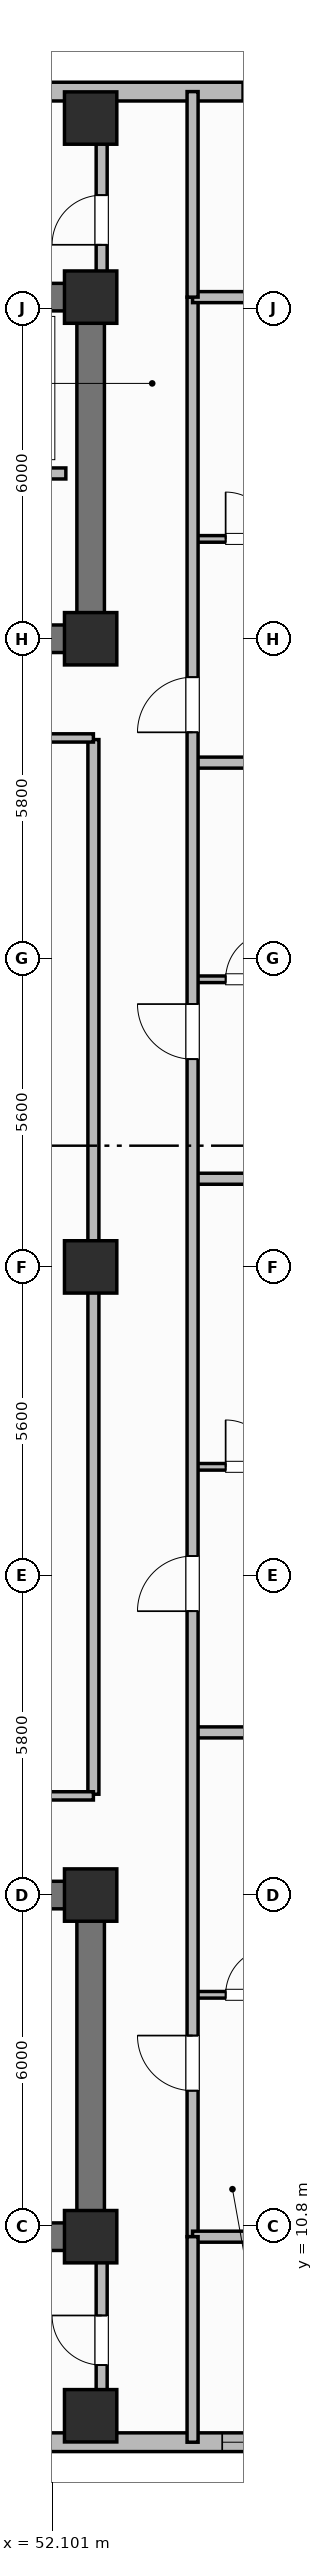
"""IFC4 building model, lengths in metres.
Left out: names, types, materials, properties, quantities, classifications, styles, units other than length and angle.
Written with IfcOpenShell. Run it as: python <this file> out.ifc"""

import sys

from ifc_helpers import new_model, si_unit, direction, frame, frame_2d, origin, origin_2d, place, context, subcontext, project, spatial, rectangle, extrude, element, fill, save


model = new_model("IFC4")
c1 = context("Model", 3, precision=1e-05, world=origin(), true_north=direction((0.0, 1.0)))
c2 = subcontext(c1, "Body", "Model", "MODEL_VIEW")
j1 = project(units=[si_unit("LENGTHUNIT", "METRE"), si_unit("PLANEANGLEUNIT", "RADIAN")], contexts=[c1])
p1 = place(None, origin())
s1 = spatial("IfcSite", under=j1, at=p1, CompositionType="ELEMENT")
p2 = place(p1, origin())
s2 = spatial("IfcBuilding", under=s1, at=p2, CompositionType="ELEMENT")
p3 = place(p2, frame((0.0, 0.0, 181.1)))
s3 = spatial("IfcBuildingStorey", under=s2, at=p3, CompositionType="ELEMENT", Elevation=181.1)
p4 = place(p3, frame((52.8, 10.6, 0.0), z_axis=(0.0, 0.0, 1.0), x_axis=(-1.0, 0.0, 0.0)))
e1 = element("IfcWall", 1, at=p4, inside=s3, PredefinedType="SHEAR", context=c2, shape_type="SweptSolid", body=[
    extrude(rectangle(XDim=27.2, YDim=0.5, at=frame_2d((13.6, 0.0))), origin(), (0.0, 0.0, 1.0), 3.7),
])
p5 = place(p3, frame((52.8, 10.85, 0.0), z_axis=(0.0, 0.0, 1.0), x_axis=(0.0, 1.0, 0.0)))
e2 = element("IfcWall", 2, at=p5, inside=s3, PredefinedType="SHEAR", context=c2, shape_type="SweptSolid", body=[
    extrude(rectangle(XDim=5.7, YDim=0.5, at=frame_2d((2.85, 0.0))), origin(), (0.0, 0.0, 1.0), 3.7),
])
p6 = place(p3, frame((25.6, 16.8, 0.0), z_axis=(0.0, 0.0, 1.0), x_axis=(1.0, 0.0, 0.0)))
e3 = element("IfcWall", 3, at=p6, inside=s3, PredefinedType="SHEAR", context=c2, shape_type="SweptSolid", body=[
    extrude(rectangle(XDim=27.2, YDim=0.5, at=frame_2d((13.6, 0.0))), origin(), (0.0, 0.0, 1.0), 3.7),
])
p7 = place(p6, frame((1.9, 0.0, 0.0)))
e4 = element("IfcOpeningElement", 4, at=p7, cuts=e3, PredefinedType="OPENING", context=c2, shape_type="SweptSolid", body=[
    extrude(rectangle(XDim=1.1, YDim=2.15, at=frame_2d((0.55, 1.075))), frame((0.0, 0.26, 0.0), z_axis=(0.0, -1.0, 0.0), x_axis=(1.0, 0.0, 0.0)), (0.0, 0.0, 1.0), 0.52),
])
p8 = place(p6, frame((13.0, 0.0, 0.0)))
e5 = element("IfcOpeningElement", 5, at=p8, cuts=e3, PredefinedType="OPENING", context=c2, shape_type="SweptSolid", body=[
    extrude(rectangle(XDim=1.2, YDim=2.15, at=frame_2d((0.6, 1.075))), frame((0.0, 0.26, 0.0), z_axis=(0.0, -1.0, 0.0), x_axis=(1.0, 0.0, 0.0)), (0.0, 0.0, 1.0), 0.52),
])
p9 = place(p6, frame((21.6, 0.0, 0.0)))
e6 = element("IfcOpeningElement", 6, at=p9, cuts=e3, PredefinedType="OPENING", context=c2, shape_type="SweptSolid", body=[
    extrude(rectangle(XDim=1.0, YDim=2.15, at=frame_2d((0.5, 1.075))), frame((0.0, 0.26, 0.0), z_axis=(0.0, -1.0, 0.0), x_axis=(1.0, 0.0, 0.0)), (0.0, 0.0, 1.0), 0.52),
])
p10 = place(p3, frame((25.6, 45.8, 0.0), z_axis=(0.0, 0.0, 1.0), x_axis=(1.0, 0.0, 0.0)))
e7 = element("IfcWall", 7, at=p10, inside=s3, PredefinedType="SHEAR", context=c2, shape_type="SweptSolid", body=[
    extrude(rectangle(XDim=27.2, YDim=0.5, at=frame_2d((13.6, 0.0))), origin(), (0.0, 0.0, 1.0), 3.7),
])
p11 = place(p3, frame((52.8, 39.85, 0.0), z_axis=(0.0, 0.0, 1.0), x_axis=(0.0, 1.0, 0.0)))
e8 = element("IfcWall", 8, at=p11, inside=s3, PredefinedType="SHEAR", context=c2, shape_type="SweptSolid", body=[
    extrude(rectangle(XDim=5.7, YDim=0.5, at=frame_2d((2.85, 0.0))), origin(), (0.0, 0.0, 1.0), 3.7),
])
p12 = place(p3, frame((52.8, 39.6, 0.0), z_axis=(0.0, 0.0, 1.0), x_axis=(-1.0, 0.0, 0.0)))
e9 = element("IfcWall", 9, at=p12, inside=s3, PredefinedType="SHEAR", context=c2, shape_type="SweptSolid", body=[
    extrude(rectangle(XDim=27.2, YDim=0.5, at=frame_2d((13.6, 0.0))), origin(), (0.0, 0.0, 1.0), 3.7),
])
p13 = place(p12, frame((24.2, 0.0, 0.0)))
e10 = element("IfcOpeningElement", 10, at=p13, cuts=e9, PredefinedType="OPENING", context=c2, shape_type="SweptSolid", body=[
    extrude(rectangle(XDim=1.1, YDim=2.15, at=frame_2d((0.55, 1.075))), frame((0.0, 0.26, 0.0), z_axis=(0.0, -1.0, 0.0), x_axis=(1.0, 0.0, 0.0)), (0.0, 0.0, 1.0), 0.52),
])
p14 = place(p12, frame((15.1, 0.0, 0.0)))
e11 = element("IfcOpeningElement", 11, at=p14, cuts=e9, PredefinedType="OPENING", context=c2, shape_type="SweptSolid", body=[
    extrude(rectangle(XDim=1.2, YDim=2.15, at=frame_2d((0.6, 1.075))), frame((0.0, 0.26, 0.0), z_axis=(0.0, -1.0, 0.0), x_axis=(1.0, 0.0, 0.0)), (0.0, 0.0, 1.0), 0.52),
])
p15 = place(p12, frame((11.6, 0.0, 0.0)))
e12 = element("IfcOpeningElement", 12, at=p15, cuts=e9, PredefinedType="OPENING", context=c2, shape_type="SweptSolid", body=[
    extrude(rectangle(XDim=0.9, YDim=2.1, at=frame_2d((0.45, 1.05))), frame((0.0, 0.26, 0.0), z_axis=(0.0, -1.0, 0.0), x_axis=(1.0, 0.0, 0.0)), (0.0, 0.0, 1.0), 0.52),
])
p16 = place(p12, frame((7.35, 0.0, 0.0)))
e13 = element("IfcOpeningElement", 13, at=p16, cuts=e9, PredefinedType="OPENING", context=c2, shape_type="SweptSolid", body=[
    extrude(rectangle(XDim=0.85, YDim=2.1, at=frame_2d((0.425, 1.05))), frame((0.0, 0.26, 0.0), z_axis=(0.0, -1.0, 0.0), x_axis=(1.0, 0.0, 0.0)), (0.0, 0.0, 1.0), 0.52),
])
p17 = place(p12, frame((3.6, 0.0, 0.0)))
e14 = element("IfcOpeningElement", 14, at=p17, cuts=e9, PredefinedType="OPENING", context=c2, shape_type="SweptSolid", body=[
    extrude(rectangle(XDim=1.0, YDim=2.15, at=frame_2d((0.5, 1.075))), frame((0.0, 0.26, 0.0), z_axis=(0.0, -1.0, 0.0), x_axis=(1.0, 0.0, 0.0)), (0.0, 0.0, 1.0), 0.52),
])
for number, where, z_axis, x_axis in (
    (15, (52.8, 10.6, 0.0), (0.0, 0.0, 1.0), (1.0, 0.0, 0.0)),
    (16, (52.8, 16.8, 0.0), (0.0, 0.0, 1.0), (1.0, 0.0, 0.0)),
    (17, (52.8, 39.6, 0.0), (0.0, 0.0, 1.0), (1.0, 0.0, 0.0)),
    (18, (52.8, 45.8, 0.0), (0.0, 0.0, 1.0), (1.0, 0.0, 0.0)),
    (19, (52.8, 28.2, 0.0), (0.0, 0.0, 1.0), (1.0, 0.0, 0.0)),
    (20, (52.8, 7.35, 0.0), (0.0, 0.0, 1.0), (1.0, 0.0, 0.0)),
    (21, (52.8, 49.05, 0.0), (0.0, 0.0, 1.0), (1.0, 0.0, 0.0)),
):
    element("IfcColumn", number, at=place(p3, frame(where, z_axis=z_axis, x_axis=x_axis)), inside=s3, PredefinedType="COLUMN", context=c2, shape_type="SweptSolid", body=[
        extrude(rectangle(XDim=0.95, YDim=0.95, at=origin_2d()), origin(), (0.0, 0.0, 1.0), 3.7),
    ])
p18 = place(p3, frame((42.4, 6.87, 0.0), z_axis=(0.0, 0.0, 1.0), x_axis=(1.0, 0.0, 0.0)))
e22 = element("IfcWall", 22, at=p18, inside=s3, PredefinedType="SOLIDWALL", context=c2, shape_type="SweptSolid", body=[
    extrude(rectangle(XDim=15.8, YDim=0.34, at=frame_2d((7.9, 0.0))), origin(), (0.0, 0.0, 1.0), 2.72),
])
p19 = place(p18, frame((2.262, 0.0, 0.75)))
e23 = element("IfcOpeningElement", 23, at=p19, cuts=e22, PredefinedType="OPENING", context=c2, shape_type="SweptSolid", body=[
    extrude(rectangle(XDim=1.8, YDim=1.85, at=frame_2d((0.9, 0.925))), frame((0.0, 0.18, 0.0), z_axis=(0.0, -1.0, 0.0), x_axis=(1.0, 0.0, 0.0)), (0.0, 0.0, 1.0), 0.36),
])
p20 = place(p18, frame((5.188, 0.0, 0.75)))
e24 = element("IfcOpeningElement", 24, at=p20, cuts=e22, PredefinedType="OPENING", context=c2, shape_type="SweptSolid", body=[
    extrude(rectangle(XDim=1.8, YDim=1.85, at=frame_2d((0.9, 0.925))), frame((0.0, 0.18, 0.0), z_axis=(0.0, -1.0, 0.0), x_axis=(1.0, 0.0, 0.0)), (0.0, 0.0, 1.0), 0.36),
])
p21 = place(p18, frame((12.788, 0.0, 0.75)))
e25 = element("IfcOpeningElement", 25, at=p21, cuts=e22, PredefinedType="OPENING", context=c2, shape_type="SweptSolid", body=[
    extrude(rectangle(XDim=1.8, YDim=1.85, at=frame_2d((0.9, 0.925))), frame((0.0, 0.18, 0.0), z_axis=(0.0, -1.0, 0.0), x_axis=(1.0, 0.0, 0.0)), (0.0, 0.0, 1.0), 0.36),
])
p22 = place(p3, frame((58.2, 49.53, 0.0), z_axis=(0.0, 0.0, 1.0), x_axis=(-1.0, 0.0, 0.0)))
e26 = element("IfcWall", 26, at=p22, inside=s3, PredefinedType="SOLIDWALL", context=c2, shape_type="SweptSolid", body=[
    extrude(rectangle(XDim=15.8, YDim=0.34, at=frame_2d((7.9, 0.0))), origin(), (0.0, 0.0, 1.0), 2.72),
])
p23 = place(p22, frame((1.55, 0.0, 0.95)))
e27 = element("IfcOpeningElement", 27, at=p23, cuts=e26, PredefinedType="OPENING", context=c2, shape_type="SweptSolid", body=[
    extrude(rectangle(XDim=1.1, YDim=1.65, at=frame_2d((0.55, 0.825))), frame((0.0, 0.18, 0.0), z_axis=(0.0, -1.0, 0.0), x_axis=(1.0, 0.0, 0.0)), (0.0, 0.0, 1.0), 0.36),
])
p24 = place(p22, frame((7.35, 0.0, 0.95)))
e28 = element("IfcOpeningElement", 28, at=p24, cuts=e26, PredefinedType="OPENING", context=c2, shape_type="SweptSolid", body=[
    extrude(rectangle(XDim=1.1, YDim=1.65, at=frame_2d((0.55, 0.825))), frame((0.0, 0.18, 0.0), z_axis=(0.0, -1.0, 0.0), x_axis=(1.0, 0.0, 0.0)), (0.0, 0.0, 1.0), 0.36),
])
p25 = place(p22, frame((11.3, 0.0, 0.95)))
e29 = element("IfcOpeningElement", 29, at=p25, cuts=e26, PredefinedType="OPENING", context=c2, shape_type="SweptSolid", body=[
    extrude(rectangle(XDim=1.1, YDim=1.65, at=frame_2d((0.55, 0.825))), frame((0.0, 0.18, 0.0), z_axis=(0.0, -1.0, 0.0), x_axis=(1.0, 0.0, 0.0)), (0.0, 0.0, 1.0), 0.36),
])
p26 = place(p3, frame((52.35, 42.6, 0.0), z_axis=(0.0, 0.0, 1.0), x_axis=(-1.0, 0.0, 0.0)))
e30 = element("IfcWall", 30, at=p26, inside=s3, PredefinedType="PARTITIONING", context=c2, shape_type="SweptSolid", body=[
    extrude(rectangle(XDim=6.5, YDim=0.2, at=frame_2d((3.25, 0.0))), origin(), (0.0, 0.0, 1.0), 2.55),
])
p27 = place(p3, frame((52.85, 18.63, 0.0), z_axis=(0.0, 0.0, 1.0), x_axis=(0.0, 1.0, 0.0)))
e31 = element("IfcWall", 31, at=p27, inside=s3, PredefinedType="PARTITIONING", context=c2, shape_type="SweptSolid", body=[
    extrude(rectangle(XDim=19.14, YDim=0.2, at=frame_2d((9.57, 0.0))), origin(), (0.0, 0.0, 1.0), 2.55),
])
for number, where, z_axis, x_axis in (
    (32, (31.35, 18.6, 0.0), (0.0, 0.0, 1.0), (1.0, 0.0, 0.0)),
    (33, (31.35, 37.8, 0.0), (0.0, 0.0, 1.0), (1.0, 0.0, 0.0)),
):
    element("IfcWall", number, at=place(p3, frame(where, z_axis=z_axis, x_axis=x_axis)), inside=s3, PredefinedType="PARTITIONING", context=c2, shape_type="SweptSolid", body=[
        extrude(rectangle(XDim=21.5, YDim=0.15, at=frame_2d((10.75, 0.0))), origin(), (0.0, 0.0, 1.0), 2.55),
    ])
p28 = place(p3, frame((54.65, 14.99, 0.0), z_axis=(0.0, 0.0, 1.0), x_axis=(1.0, 0.0, 0.0)))
e34 = element("IfcWall", 34, at=p28, inside=s3, PredefinedType="PARTITIONING", context=c2, shape_type="SweptSolid", body=[
    extrude(rectangle(XDim=2.25, YDim=0.12, at=frame_2d((1.125, 0.0))), origin(), (0.0, 0.0, 1.0), 2.55),
])
p29 = place(p28, frame((0.6, 0.0, 0.0)))
e35 = element("IfcOpeningElement", 35, at=p29, cuts=e34, PredefinedType="OPENING", context=c2, shape_type="SweptSolid", body=[
    extrude(rectangle(XDim=0.85, YDim=2.1, at=frame_2d((0.425, 1.05))), frame((0.0, 0.07, 0.0), z_axis=(0.0, -1.0, 0.0), x_axis=(1.0, 0.0, 0.0)), (0.0, 0.0, 1.0), 0.14),
])
p30 = place(p3, frame((54.65, 19.752, 0.0), z_axis=(0.0, 0.0, 1.0), x_axis=(1.0, 0.0, 0.0)))
e36 = element("IfcWall", 36, at=p30, inside=s3, PredefinedType="PARTITIONING", context=c2, shape_type="SweptSolid", body=[
    extrude(rectangle(XDim=7.18, YDim=0.2, at=frame_2d((3.59, 0.0))), origin(), (0.0, 0.0, 1.0), 2.55),
])
p31 = place(p3, frame((54.65, 24.572, 0.0), z_axis=(0.0, 0.0, 1.0), x_axis=(1.0, 0.0, 0.0)))
e37 = element("IfcWall", 37, at=p31, inside=s3, PredefinedType="PARTITIONING", context=c2, shape_type="SweptSolid", body=[
    extrude(rectangle(XDim=2.25, YDim=0.12, at=frame_2d((1.125, 0.0))), origin(), (0.0, 0.0, 1.0), 2.55),
])
p32 = place(p31, frame((0.6, 0.0, 0.0)))
e38 = element("IfcOpeningElement", 38, at=p32, cuts=e37, PredefinedType="OPENING", context=c2, shape_type="SweptSolid", body=[
    extrude(rectangle(XDim=0.85, YDim=2.1, at=frame_2d((0.425, 1.05))), frame((0.0, 0.07, 0.0), z_axis=(0.0, -1.0, 0.0), x_axis=(1.0, 0.0, 0.0)), (0.0, 0.0, 1.0), 0.14),
])
p33 = place(p3, frame((54.65, 29.8, 0.0), z_axis=(0.0, 0.0, 1.0), x_axis=(1.0, 0.0, 0.0)))
e39 = element("IfcWall", 39, at=p33, inside=s3, PredefinedType="PARTITIONING", context=c2, shape_type="SweptSolid", body=[
    extrude(rectangle(XDim=6.78, YDim=0.2, at=frame_2d((3.39, 0.0))), origin(), (0.0, 0.0, 1.0), 2.55),
])
p34 = place(p3, frame((54.65, 33.42, 0.0), z_axis=(0.0, 0.0, 1.0), x_axis=(1.0, 0.0, 0.0)))
e40 = element("IfcWall", 40, at=p34, inside=s3, PredefinedType="PARTITIONING", context=c2, shape_type="SweptSolid", body=[
    extrude(rectangle(XDim=2.25, YDim=0.12, at=frame_2d((1.125, 0.0))), origin(), (0.0, 0.0, 1.0), 2.55),
])
p35 = place(p34, frame((0.6, 0.0, 0.0)))
e41 = element("IfcOpeningElement", 41, at=p35, cuts=e40, PredefinedType="OPENING", context=c2, shape_type="SweptSolid", body=[
    extrude(rectangle(XDim=0.85, YDim=2.1, at=frame_2d((0.425, 1.05))), frame((0.0, 0.07, 0.0), z_axis=(0.0, -1.0, 0.0), x_axis=(1.0, 0.0, 0.0)), (0.0, 0.0, 1.0), 0.14),
])
p36 = place(p3, frame((54.65, 37.352, 0.0), z_axis=(0.0, 0.0, 1.0), x_axis=(1.0, 0.0, 0.0)))
e42 = element("IfcWall", 42, at=p36, inside=s3, PredefinedType="PARTITIONING", context=c2, shape_type="SweptSolid", body=[
    extrude(rectangle(XDim=7.18, YDim=0.2, at=frame_2d((3.59, 0.0))), origin(), (0.0, 0.0, 1.0), 2.55),
])
p37 = place(p3, frame((54.65, 41.412, 0.0), z_axis=(0.0, 0.0, 1.0), x_axis=(1.0, 0.0, 0.0)))
e43 = element("IfcWall", 43, at=p37, inside=s3, PredefinedType="PARTITIONING", context=c2, shape_type="SweptSolid", body=[
    extrude(rectangle(XDim=2.25, YDim=0.12, at=frame_2d((1.125, 0.0))), origin(), (0.0, 0.0, 1.0), 2.55),
])
p38 = place(p37, frame((0.6, 0.0, 0.0)))
e44 = element("IfcOpeningElement", 44, at=p38, cuts=e43, PredefinedType="OPENING", context=c2, shape_type="SweptSolid", body=[
    extrude(rectangle(XDim=0.85, YDim=2.1, at=frame_2d((0.425, 1.05))), frame((0.0, 0.07, 0.0), z_axis=(0.0, -1.0, 0.0), x_axis=(1.0, 0.0, 0.0)), (0.0, 0.0, 1.0), 0.14),
])
p39 = place(p3, frame((54.65, 10.6, 0.0), z_axis=(0.0, 0.0, 1.0), x_axis=(0.0, 1.0, 0.0)))
e45 = element("IfcWall", 45, at=p39, inside=s3, PredefinedType="PARTITIONING", context=c2, shape_type="SweptSolid", body=[
    extrude(rectangle(XDim=35.2, YDim=0.2, at=frame_2d((17.6, 0.0))), origin(), (0.0, 0.0, 1.0), 2.55),
])
p40 = place(p39, frame((2.65, 0.0, 0.0)))
e46 = element("IfcOpeningElement", 46, at=p40, cuts=e45, PredefinedType="OPENING", context=c2, shape_type="SweptSolid", body=[
    extrude(rectangle(XDim=1.0, YDim=2.15, at=frame_2d((0.5, 1.075))), frame((0.0, 0.11, 0.0), z_axis=(0.0, -1.0, 0.0), x_axis=(1.0, 0.0, 0.0)), (0.0, 0.0, 1.0), 0.22),
])
p41 = place(p39, frame((11.352, 0.0, 0.0)))
e47 = element("IfcOpeningElement", 47, at=p41, cuts=e45, PredefinedType="OPENING", context=c2, shape_type="SweptSolid", body=[
    extrude(rectangle(XDim=1.0, YDim=2.15, at=frame_2d((0.5, 1.075))), frame((0.0, 0.11, 0.0), z_axis=(0.0, -1.0, 0.0), x_axis=(1.0, 0.0, 0.0)), (0.0, 0.0, 1.0), 0.22),
])
p42 = place(p39, frame((21.37, 0.0, 0.0)))
e48 = element("IfcOpeningElement", 48, at=p42, cuts=e45, PredefinedType="OPENING", context=c2, shape_type="SweptSolid", body=[
    extrude(rectangle(XDim=1.0, YDim=2.15, at=frame_2d((0.5, 1.075))), frame((0.0, 0.11, 0.0), z_axis=(0.0, -1.0, 0.0), x_axis=(1.0, 0.0, 0.0)), (0.0, 0.0, 1.0), 0.22),
])
p43 = place(p39, frame((27.302, 0.0, 0.0)))
e49 = element("IfcOpeningElement", 49, at=p43, cuts=e45, PredefinedType="OPENING", context=c2, shape_type="SweptSolid", body=[
    extrude(rectangle(XDim=1.0, YDim=2.15, at=frame_2d((0.5, 1.075))), frame((0.0, 0.11, 0.0), z_axis=(0.0, -1.0, 0.0), x_axis=(1.0, 0.0, 0.0)), (0.0, 0.0, 1.0), 0.22),
])
for number, where, z_axis, x_axis in (
    (50, (54.65, 10.6, 0.0), (0.0, 0.0, 1.0), (1.0, 0.0, 0.0)),
    (51, (54.65, 45.8, 0.0), (0.0, 0.0, 1.0), (1.0, 0.0, 0.0)),
):
    element("IfcWall", number, at=place(p3, frame(where, z_axis=z_axis, x_axis=x_axis)), inside=s3, PredefinedType="PARTITIONING", context=c2, shape_type="SweptSolid", body=[
        extrude(rectangle(XDim=6.76, YDim=0.2, at=frame_2d((3.38, 0.0))), origin(), (0.0, 0.0, 1.0), 2.55),
    ])
for number, where, z_axis, x_axis in (
    (52, (54.65, 6.87, 0.0), (0.0, 0.0, 1.0), (0.0, 1.0, 0.0)),
    (53, (54.65, 45.8, 0.0), (0.0, 0.0, 1.0), (0.0, 1.0, 0.0)),
):
    element("IfcWall", number, at=place(p3, frame(where, z_axis=z_axis, x_axis=x_axis)), inside=s3, PredefinedType="PARTITIONING", context=c2, shape_type="SweptSolid", body=[
        extrude(rectangle(XDim=3.73, YDim=0.2, at=frame_2d((1.865, 0.0))), origin(), (0.0, 0.0, 1.0), 2.55),
    ])
p44 = place(p3, frame((53.0, 7.62, 0.0), z_axis=(0.0, 0.0, 1.0), x_axis=(0.0, 1.0, 0.0)))
e54 = element("IfcWall", 54, at=p44, inside=s3, PredefinedType="PARTITIONING", context=c2, shape_type="SweptSolid", body=[
    extrude(rectangle(XDim=2.68, YDim=0.2, at=frame_2d((1.34, 0.0))), origin(), (0.0, 0.0, 1.0), 2.55),
])
p45 = place(p44, frame((0.65, 0.0, 0.0)))
e55 = element("IfcOpeningElement", 55, at=p45, cuts=e54, PredefinedType="OPENING", context=c2, shape_type="SweptSolid", body=[
    extrude(rectangle(XDim=0.9, YDim=2.1, at=frame_2d((0.45, 1.05))), frame((0.0, 0.11, 0.0), z_axis=(0.0, -1.0, 0.0), x_axis=(1.0, 0.0, 0.0)), (0.0, 0.0, 1.0), 0.22),
])
p46 = place(p3, frame((53.0, 46.1, 0.0), z_axis=(0.0, 0.0, 1.0), x_axis=(0.0, 1.0, 0.0)))
e56 = element("IfcWall", 56, at=p46, inside=s3, PredefinedType="PARTITIONING", context=c2, shape_type="SweptSolid", body=[
    extrude(rectangle(XDim=2.68, YDim=0.2, at=frame_2d((1.34, 0.0))), origin(), (0.0, 0.0, 1.0), 2.55),
])
p47 = place(p46, frame((0.65, 0.0, 0.0)))
e57 = element("IfcOpeningElement", 57, at=p47, cuts=e56, PredefinedType="OPENING", context=c2, shape_type="SweptSolid", body=[
    extrude(rectangle(XDim=0.9, YDim=2.1, at=frame_2d((0.45, 1.05))), frame((0.0, 0.11, 0.0), z_axis=(0.0, -1.0, 0.0), x_axis=(1.0, 0.0, 0.0)), (0.0, 0.0, 1.0), 0.22),
])
p48 = place(p21, origin())
e58 = element("IfcWindow", 58, at=p48, inside=s3, PartitioningType="SINGLE_PANEL", PredefinedType="WINDOW", context=c2, shape_type="SweptSolid", body=[
    extrude(rectangle(XDim=1.8, YDim=1.85, at=frame_2d((0.9, 0.925))), frame((0.0, 0.03, 0.0), z_axis=(0.0, -1.0, 0.0), x_axis=(1.0, 0.0, 0.0)), (0.0, 0.0, 1.0), 0.06),
])
fill(e25, e58)
p49 = place(p23, origin())
e59 = element("IfcWindow", 59, at=p49, inside=s3, PartitioningType="SINGLE_PANEL", PredefinedType="WINDOW", context=c2, shape_type="SweptSolid", body=[
    extrude(rectangle(XDim=1.1, YDim=1.65, at=frame_2d((0.55, 0.825))), frame((0.0, 0.03, 0.0), z_axis=(0.0, -1.0, 0.0), x_axis=(1.0, 0.0, 0.0)), (0.0, 0.0, 1.0), 0.06),
])
fill(e27, e59)
p50 = place(p29, origin())
e60 = element("IfcDoor", 60, at=p50, inside=s3, OperationType="SINGLE_SWING_RIGHT", PredefinedType="DOOR", context=c2, shape_type="SweptSolid", body=[
    extrude(rectangle(XDim=0.85, YDim=2.1, at=frame_2d((0.425, 1.05))), frame((0.0, 0.025, 0.0), z_axis=(0.0, -1.0, 0.0), x_axis=(1.0, 0.0, 0.0)), (0.0, 0.0, 1.0), 0.05),
])
fill(e35, e60)
p51 = place(p32, origin())
e61 = element("IfcDoor", 61, at=p51, inside=s3, OperationType="SINGLE_SWING_LEFT", PredefinedType="DOOR", context=c2, shape_type="SweptSolid", body=[
    extrude(rectangle(XDim=0.85, YDim=2.1, at=frame_2d((0.425, 1.05))), frame((0.0, 0.025, 0.0), z_axis=(0.0, -1.0, 0.0), x_axis=(1.0, 0.0, 0.0)), (0.0, 0.0, 1.0), 0.05),
])
fill(e38, e61)
p52 = place(p35, origin())
e62 = element("IfcDoor", 62, at=p52, inside=s3, OperationType="SINGLE_SWING_RIGHT", PredefinedType="DOOR", context=c2, shape_type="SweptSolid", body=[
    extrude(rectangle(XDim=0.85, YDim=2.1, at=frame_2d((0.425, 1.05))), frame((0.0, 0.025, 0.0), z_axis=(0.0, -1.0, 0.0), x_axis=(1.0, 0.0, 0.0)), (0.0, 0.0, 1.0), 0.05),
])
fill(e41, e62)
p53 = place(p38, origin())
e63 = element("IfcDoor", 63, at=p53, inside=s3, OperationType="SINGLE_SWING_LEFT", PredefinedType="DOOR", context=c2, shape_type="SweptSolid", body=[
    extrude(rectangle(XDim=0.85, YDim=2.1, at=frame_2d((0.425, 1.05))), frame((0.0, 0.025, 0.0), z_axis=(0.0, -1.0, 0.0), x_axis=(1.0, 0.0, 0.0)), (0.0, 0.0, 1.0), 0.05),
])
fill(e44, e63)
p54 = place(p40, origin())
e64 = element("IfcDoor", 64, at=p54, inside=s3, OperationType="SINGLE_SWING_RIGHT", PredefinedType="DOOR", context=c2, shape_type="SweptSolid", body=[
    extrude(rectangle(XDim=1.0, YDim=2.15, at=frame_2d((0.5, 1.075))), frame((0.0, 0.025, 0.0), z_axis=(0.0, -1.0, 0.0), x_axis=(1.0, 0.0, 0.0)), (0.0, 0.0, 1.0), 0.05),
])
fill(e46, e64)
p55 = place(p41, origin())
e65 = element("IfcDoor", 65, at=p55, inside=s3, OperationType="SINGLE_SWING_LEFT", PredefinedType="DOOR", context=c2, shape_type="SweptSolid", body=[
    extrude(rectangle(XDim=1.0, YDim=2.15, at=frame_2d((0.5, 1.075))), frame((0.0, 0.025, 0.0), z_axis=(0.0, -1.0, 0.0), x_axis=(1.0, 0.0, 0.0)), (0.0, 0.0, 1.0), 0.05),
])
fill(e47, e65)
p56 = place(p42, origin())
e66 = element("IfcDoor", 66, at=p56, inside=s3, OperationType="SINGLE_SWING_RIGHT", PredefinedType="DOOR", context=c2, shape_type="SweptSolid", body=[
    extrude(rectangle(XDim=1.0, YDim=2.15, at=frame_2d((0.5, 1.075))), frame((0.0, 0.025, 0.0), z_axis=(0.0, -1.0, 0.0), x_axis=(1.0, 0.0, 0.0)), (0.0, 0.0, 1.0), 0.05),
])
fill(e48, e66)
p57 = place(p43, origin())
e67 = element("IfcDoor", 67, at=p57, inside=s3, OperationType="SINGLE_SWING_LEFT", PredefinedType="DOOR", context=c2, shape_type="SweptSolid", body=[
    extrude(rectangle(XDim=1.0, YDim=2.15, at=frame_2d((0.5, 1.075))), frame((0.0, 0.025, 0.0), z_axis=(0.0, -1.0, 0.0), x_axis=(1.0, 0.0, 0.0)), (0.0, 0.0, 1.0), 0.05),
])
fill(e49, e67)
p58 = place(p45, origin())
e68 = element("IfcDoor", 68, at=p58, inside=s3, OperationType="SINGLE_SWING_RIGHT", PredefinedType="DOOR", context=c2, shape_type="SweptSolid", body=[
    extrude(rectangle(XDim=0.9, YDim=2.1, at=frame_2d((0.45, 1.05))), frame((0.0, 0.025, 0.0), z_axis=(0.0, -1.0, 0.0), x_axis=(1.0, 0.0, 0.0)), (0.0, 0.0, 1.0), 0.05),
])
fill(e55, e68)
p59 = place(p47, origin())
e69 = element("IfcDoor", 69, at=p59, inside=s3, OperationType="SINGLE_SWING_LEFT", PredefinedType="DOOR", context=c2, shape_type="SweptSolid", body=[
    extrude(rectangle(XDim=0.9, YDim=2.1, at=frame_2d((0.45, 1.05))), frame((0.0, 0.025, 0.0), z_axis=(0.0, -1.0, 0.0), x_axis=(1.0, 0.0, 0.0)), (0.0, 0.0, 1.0), 0.05),
])
fill(e57, e69)
save(model, sys.argv[1])
